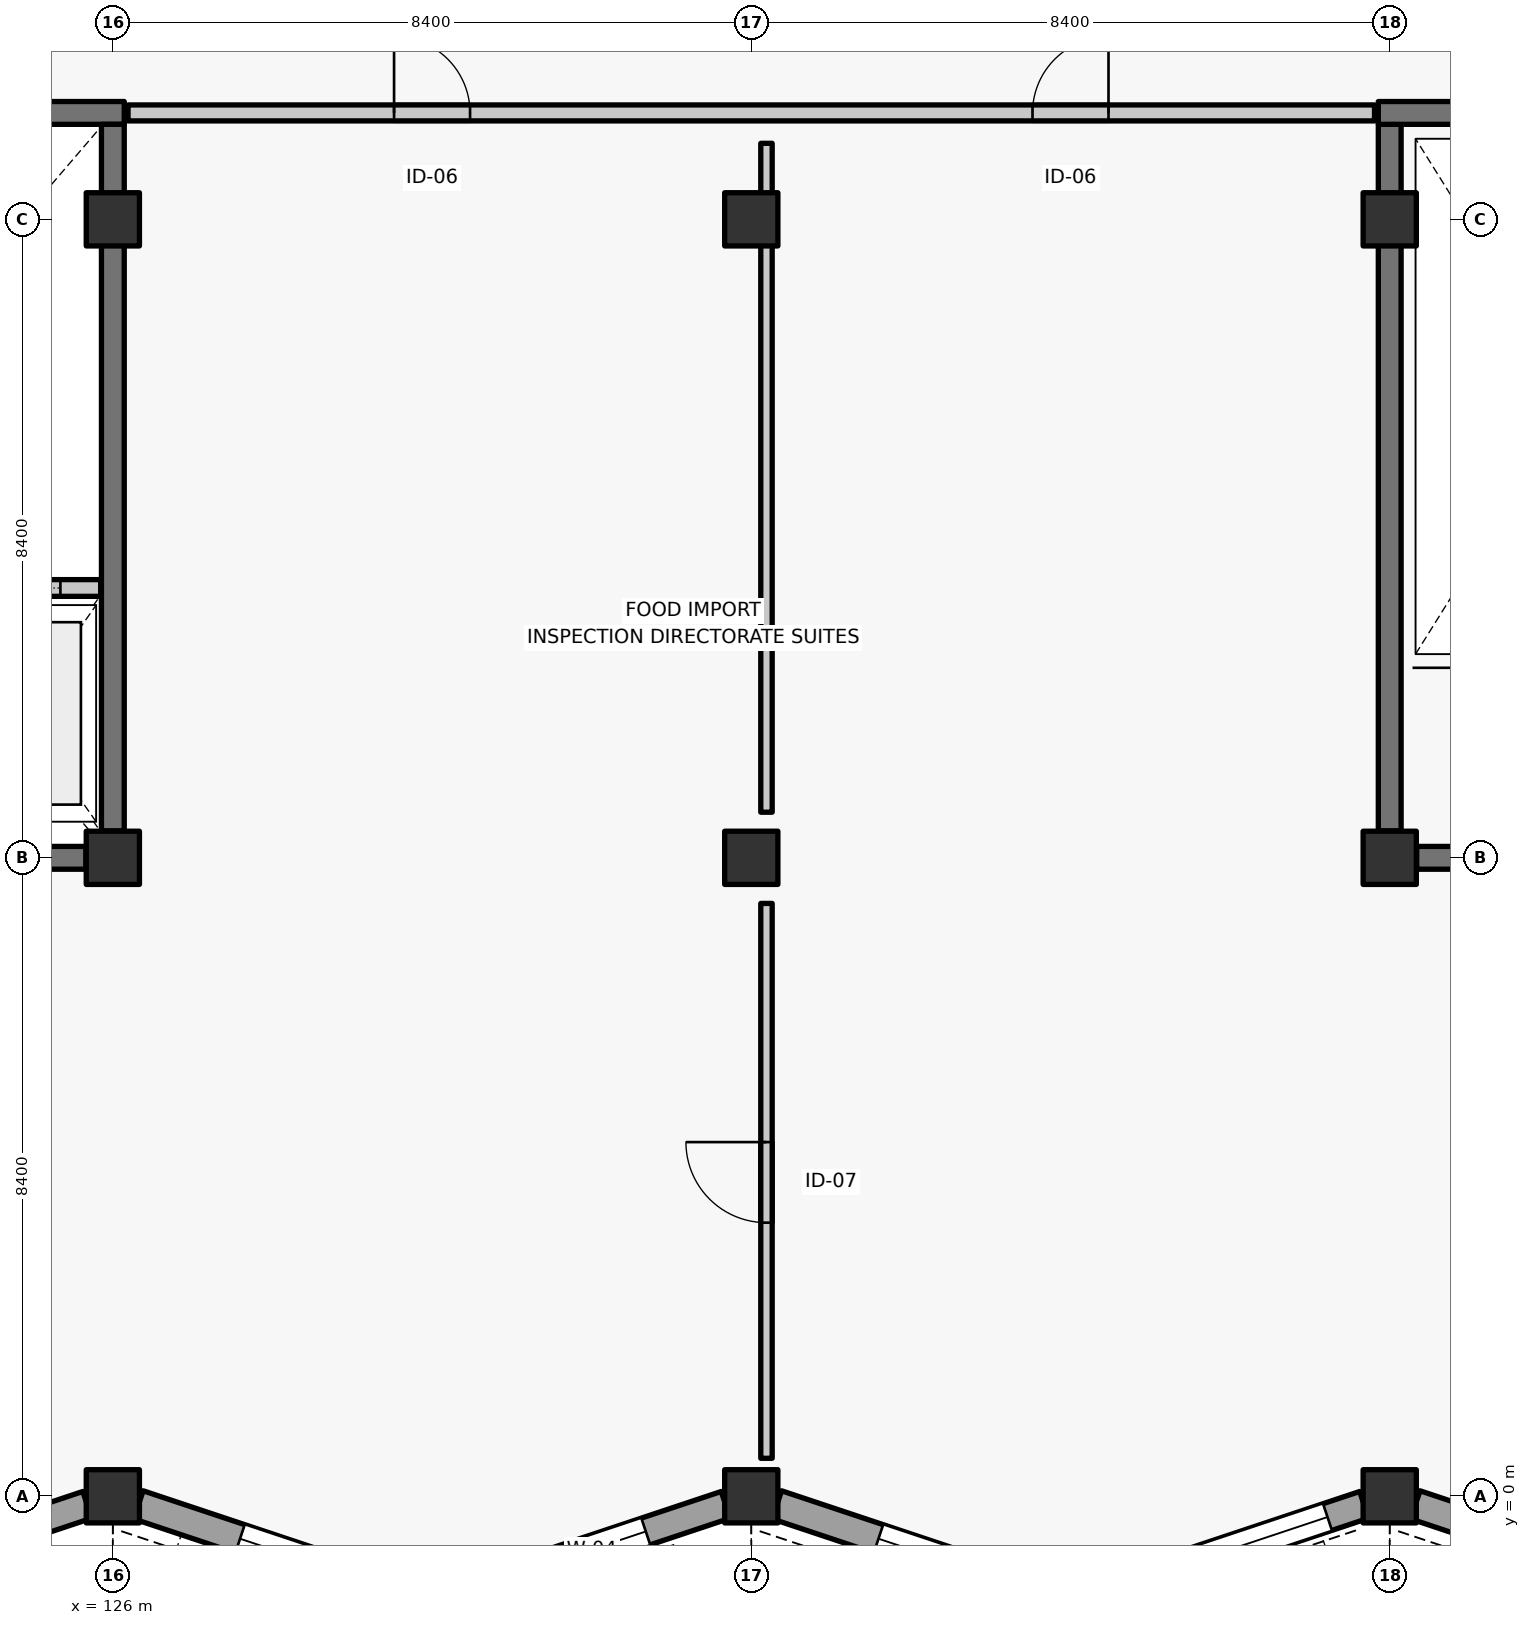
"""IFC4 building model, lengths in metres.
Left out: names, types, materials, properties, quantities, classifications, styles, units other than length and angle.
Written with IfcOpenShell. Run it as: python <this file> out.ifc"""

import sys

from ifc_helpers import new_model, si_unit, direction, frame, frame_2d, origin, origin_2d, place, context, subcontext, project, spatial, rectangle, extrude, element, fill, save


model = new_model("IFC4")
c1 = context("Model", 3, precision=1e-05, world=origin(), true_north=direction((0.0, 1.0)))
c2 = subcontext(c1, "Body", "Model", "MODEL_VIEW")
j1 = project(units=[si_unit("LENGTHUNIT", "METRE"), si_unit("PLANEANGLEUNIT", "RADIAN")], contexts=[c1])
p1 = place(None, origin())
s1 = spatial("IfcSite", under=j1, at=p1, CompositionType="ELEMENT")
p2 = place(p1, origin())
s2 = spatial("IfcBuilding", under=s1, at=p2, CompositionType="ELEMENT")
p3 = place(p2, frame((0.0, 0.0, 11.4)))
s3 = spatial("IfcBuildingStorey", under=s2, at=p3, CompositionType="ELEMENT", Elevation=11.4)
for number, where, z_axis, x_axis in (
    (1, (126.0, 0.0, 0.0), (0.0, 0.0, 1.0), (1.0, 0.0, 0.0)),
    (2, (126.0, 8.4, 0.0), (0.0, 0.0, 1.0), (1.0, 0.0, 0.0)),
    (3, (126.0, 16.8, 0.0), (0.0, 0.0, 1.0), (1.0, 0.0, 0.0)),
    (4, (134.4, 0.0, 0.0), (0.0, 0.0, 1.0), (1.0, 0.0, 0.0)),
    (5, (134.4, 8.4, 0.0), (0.0, 0.0, 1.0), (1.0, 0.0, 0.0)),
    (6, (134.4, 16.8, 0.0), (0.0, 0.0, 1.0), (1.0, 0.0, 0.0)),
    (7, (142.8, 0.0, 0.0), (0.0, 0.0, 1.0), (1.0, 0.0, 0.0)),
    (8, (142.8, 8.4, 0.0), (0.0, 0.0, 1.0), (1.0, 0.0, 0.0)),
    (9, (142.8, 16.8, 0.0), (0.0, 0.0, 1.0), (1.0, 0.0, 0.0)),
):
    element("IfcColumn", number, at=place(p3, frame(where, z_axis=z_axis, x_axis=x_axis)), inside=s3, PredefinedType="COLUMN", context=c2, shape_type="SweptSolid", body=[
        extrude(rectangle(XDim=0.7, YDim=0.7, at=origin_2d()), origin(), (0.0, 0.0, 1.0), 4.8),
    ])
p4 = place(p3, frame((125.663, -0.112, 0.0), z_axis=(0.0, 0.0, 1.0), x_axis=(-0.948689293515, -0.316209779056, 0.0)))
e10 = element("IfcWall", 10, at=p4, inside=s3, PredefinedType="SOLIDWALL", context=c2, shape_type="SweptSolid", body=[
    extrude(rectangle(XDim=4.072, YDim=0.37, at=frame_2d((2.036, 0.0))), origin(), (0.0, 0.0, 1.0), 4.52),
])
p5 = place(p4, frame((0.998, 0.0, 0.9)))
e11 = element("IfcOpeningElement", 11, at=p5, cuts=e10, PredefinedType="OPENING", context=c2, shape_type="SweptSolid", body=[
    extrude(rectangle(XDim=1.72, YDim=1.7, at=frame_2d((0.86, 0.85))), frame((0.0, 0.195, 0.0), z_axis=(0.0, -1.0, 0.0), x_axis=(1.0, 0.0, 0.0)), (0.0, 0.0, 1.0), 0.39),
])
p6 = place(p3, frame((130.2, -1.4, 0.0), z_axis=(0.0, 0.0, 1.0), x_axis=(-0.948689293515, 0.316209779056, 0.0)))
e12 = element("IfcWall", 12, at=p6, inside=s3, PredefinedType="SOLIDWALL", context=c2, shape_type="SweptSolid", body=[
    extrude(rectangle(XDim=4.072, YDim=0.39, at=frame_2d((2.036, 0.0))), origin(), (0.0, 0.0, 1.0), 4.52),
])
p7 = place(p6, frame((1.763, 0.0, 0.9)))
e13 = element("IfcOpeningElement", 13, at=p7, cuts=e12, PredefinedType="OPENING", context=c2, shape_type="SweptSolid", body=[
    extrude(rectangle(XDim=0.9, YDim=2.1, at=frame_2d((0.45, 1.05))), frame((0.0, 0.205, 0.0), z_axis=(0.0, -1.0, 0.0), x_axis=(1.0, 0.0, 0.0)), (0.0, 0.0, 1.0), 0.41),
])
p8 = place(p3, frame((134.063, -0.112, 0.0), z_axis=(0.0, 0.0, 1.0), x_axis=(-0.948695287956, -0.316191794027, 0.0)))
e14 = element("IfcWall", 14, at=p8, inside=s3, PredefinedType="SOLIDWALL", context=c2, shape_type="SweptSolid", body=[
    extrude(rectangle(XDim=4.072, YDim=0.37, at=frame_2d((2.036, 0.0))), origin(), (0.0, 0.0, 1.0), 4.52),
])
p9 = place(p8, frame((1.108, 0.0, 0.9)))
e15 = element("IfcOpeningElement", 15, at=p9, cuts=e14, PredefinedType="OPENING", context=c2, shape_type="SweptSolid", body=[
    extrude(rectangle(XDim=1.5, YDim=2.15, at=frame_2d((0.75, 1.075))), frame((0.0, 0.195, 0.0), z_axis=(0.0, -1.0, 0.0), x_axis=(1.0, 0.0, 0.0)), (0.0, 0.0, 1.0), 0.39),
])
p10 = place(p3, frame((138.6, -1.4, 0.0), z_axis=(0.0, 0.0, 1.0), x_axis=(-0.948695287956, 0.316191794027, 0.0)))
e16 = element("IfcWall", 16, at=p10, inside=s3, PredefinedType="SOLIDWALL", context=c2, shape_type="SweptSolid", body=[
    extrude(rectangle(XDim=4.072, YDim=0.39, at=frame_2d((2.036, 0.0))), origin(), (0.0, 0.0, 1.0), 4.52),
])
p11 = place(p10, frame((1.763, 0.0, 0.9)))
e17 = element("IfcOpeningElement", 17, at=p11, cuts=e16, PredefinedType="OPENING", context=c2, shape_type="SweptSolid", body=[
    extrude(rectangle(XDim=0.9, YDim=2.1, at=frame_2d((0.45, 1.05))), frame((0.0, 0.205, 0.0), z_axis=(0.0, -1.0, 0.0), x_axis=(1.0, 0.0, 0.0)), (0.0, 0.0, 1.0), 0.41),
])
p12 = place(p3, frame((142.463, -0.112, 0.0), z_axis=(0.0, 0.0, 1.0), x_axis=(-0.948689293515, -0.316209779056, 0.0)))
e18 = element("IfcWall", 18, at=p12, inside=s3, PredefinedType="SOLIDWALL", context=c2, shape_type="SweptSolid", body=[
    extrude(rectangle(XDim=4.072, YDim=0.37, at=frame_2d((2.036, 0.0))), origin(), (0.0, 0.0, 1.0), 4.52),
])
p13 = place(p12, frame((0.508, 0.0, 0.9)))
e19 = element("IfcOpeningElement", 19, at=p13, cuts=e18, PredefinedType="OPENING", context=c2, shape_type="SweptSolid", body=[
    extrude(rectangle(XDim=2.7, YDim=1.75, at=frame_2d((1.35, 0.875))), frame((0.0, 0.195, 0.0), z_axis=(0.0, -1.0, 0.0), x_axis=(1.0, 0.0, 0.0)), (0.0, 0.0, 1.0), 0.39),
])
p14 = place(p3, frame((147.0, -1.4, 0.0), z_axis=(0.0, 0.0, 1.0), x_axis=(-0.948695287956, 0.316191794027, 0.0)))
e20 = element("IfcWall", 20, at=p14, inside=s3, PredefinedType="SOLIDWALL", context=c2, shape_type="SweptSolid", body=[
    extrude(rectangle(XDim=4.072, YDim=0.39, at=frame_2d((2.036, 0.0))), origin(), (0.0, 0.0, 1.0), 4.52),
])
p15 = place(p14, frame((1.763, 0.0, 0.9)))
e21 = element("IfcOpeningElement", 21, at=p15, cuts=e20, PredefinedType="OPENING", context=c2, shape_type="SweptSolid", body=[
    extrude(rectangle(XDim=0.9, YDim=2.1, at=frame_2d((0.45, 1.05))), frame((0.0, 0.205, 0.0), z_axis=(0.0, -1.0, 0.0), x_axis=(1.0, 0.0, 0.0)), (0.0, 0.0, 1.0), 0.41),
])
p16 = place(p3, frame((125.645, 8.4, 0.0), z_axis=(0.0, 0.0, 1.0), x_axis=(-1.0, 0.0, 0.0)))
e22 = element("IfcWall", 22, at=p16, inside=s3, PredefinedType="SHEAR", context=c2, shape_type="SweptSolid", body=[
    extrude(rectangle(XDim=7.69, YDim=0.3, at=frame_2d((3.845, 0.0))), origin(), (0.0, 0.0, 1.0), 4.52),
])
p17 = place(p3, frame((117.45, 18.2, 0.0), z_axis=(0.0, 0.0, 1.0), x_axis=(1.0, 0.0, 0.0)))
e23 = element("IfcWall", 23, at=p17, inside=s3, PredefinedType="SHEAR", context=c2, shape_type="SweptSolid", body=[
    extrude(rectangle(XDim=8.7, YDim=0.3, at=frame_2d((4.35, 0.0))), origin(), (0.0, 0.0, 1.0), 4.52),
])
p18 = place(p17, frame((5.57, 0.0, 0.0)))
e24 = element("IfcOpeningElement", 24, at=p18, cuts=e23, PredefinedType="OPENING", context=c2, shape_type="SweptSolid", body=[
    extrude(rectangle(XDim=1.96, YDim=2.2, at=frame_2d((0.98, 1.1))), frame((0.0, 0.16, 0.0), z_axis=(0.0, -1.0, 0.0), x_axis=(1.0, 0.0, 0.0)), (0.0, 0.0, 1.0), 0.32),
])
p19 = place(p3, frame((126.0, 18.05, 0.0), z_axis=(0.0, 0.0, 1.0), x_axis=(0.0, -1.0, 0.0)))
e25 = element("IfcWall", 25, at=p19, inside=s3, PredefinedType="SHEAR", context=c2, shape_type="SweptSolid", body=[
    extrude(rectangle(XDim=9.295, YDim=0.3, at=frame_2d((4.647, 0.0))), origin(), (0.0, 0.0, 1.0), 4.52),
])
p20 = place(p3, frame((123.5, 11.95, 0.0), z_axis=(0.0, 0.0, 1.0), x_axis=(1.0, 0.0, 0.0)))
e26 = element("IfcWall", 26, at=p20, inside=s3, PredefinedType="SOLIDWALL", context=c2, shape_type="SweptSolid", body=[
    extrude(rectangle(XDim=2.34, YDim=0.22, at=frame_2d((1.17, 0.0))), origin(), (0.0, 0.0, 1.0), 4.52),
])
p21 = place(p20, frame((0.53, 0.0, 0.0)))
e27 = element("IfcOpeningElement", 27, at=p21, cuts=e26, PredefinedType="OPENING", context=c2, shape_type="SweptSolid", body=[
    extrude(rectangle(XDim=1.28, YDim=2.25, at=frame_2d((0.64, 1.125))), frame((0.0, 0.12, 0.0), z_axis=(0.0, -1.0, 0.0), x_axis=(1.0, 0.0, 0.0)), (0.0, 0.0, 1.0), 0.24),
])
p22 = place(p3, frame((150.845, 8.4, 0.0), z_axis=(0.0, 0.0, 1.0), x_axis=(-1.0, 0.0, 0.0)))
e28 = element("IfcWall", 28, at=p22, inside=s3, PredefinedType="SHEAR", context=c2, shape_type="SweptSolid", body=[
    extrude(rectangle(XDim=7.69, YDim=0.3, at=frame_2d((3.845, 0.0))), origin(), (0.0, 0.0, 1.0), 4.52),
])
p23 = place(p3, frame((142.8, 8.755, 0.0), z_axis=(0.0, 0.0, 1.0), x_axis=(0.0, 1.0, 0.0)))
e29 = element("IfcWall", 29, at=p23, inside=s3, PredefinedType="SHEAR", context=c2, shape_type="SweptSolid", body=[
    extrude(rectangle(XDim=9.295, YDim=0.3, at=frame_2d((4.647, 0.0))), origin(), (0.0, 0.0, 1.0), 4.52),
])
p24 = place(p3, frame((142.65, 18.2, 0.0), z_axis=(0.0, 0.0, 1.0), x_axis=(1.0, 0.0, 0.0)))
e30 = element("IfcWall", 30, at=p24, inside=s3, PredefinedType="SHEAR", context=c2, shape_type="SweptSolid", body=[
    extrude(rectangle(XDim=8.7, YDim=0.3, at=frame_2d((4.35, 0.0))), origin(), (0.0, 0.0, 1.0), 4.52),
])
p25 = place(p24, frame((5.57, 0.0, 0.0)))
e31 = element("IfcOpeningElement", 31, at=p25, cuts=e30, PredefinedType="OPENING", context=c2, shape_type="SweptSolid", body=[
    extrude(rectangle(XDim=1.96, YDim=2.2, at=frame_2d((0.98, 1.1))), frame((0.0, 0.16, 0.0), z_axis=(0.0, -1.0, 0.0), x_axis=(1.0, 0.0, 0.0)), (0.0, 0.0, 1.0), 0.32),
])
p26 = place(p3, frame((126.2, 18.2, 0.0), z_axis=(0.0, 0.0, 1.0), x_axis=(1.0, 0.0, 0.0)))
e32 = element("IfcWall", 32, at=p26, inside=s3, PredefinedType="PARTITIONING", context=c2, shape_type="SweptSolid", body=[
    extrude(rectangle(XDim=16.4, YDim=0.21, at=frame_2d((8.2, 0.0))), origin(), (0.0, 0.0, 1.0), 4.55),
])
p27 = place(p26, frame((3.5, 0.0, 0.0)))
e33 = element("IfcOpeningElement", 33, at=p27, cuts=e32, PredefinedType="OPENING", context=c2, shape_type="SweptSolid", body=[
    extrude(rectangle(XDim=1.0, YDim=2.15, at=frame_2d((0.5, 1.075))), frame((0.0, 0.115, 0.0), z_axis=(0.0, -1.0, 0.0), x_axis=(1.0, 0.0, 0.0)), (0.0, 0.0, 1.0), 0.23),
])
p28 = place(p26, frame((11.9, 0.0, 0.0)))
e34 = element("IfcOpeningElement", 34, at=p28, cuts=e32, PredefinedType="OPENING", context=c2, shape_type="SweptSolid", body=[
    extrude(rectangle(XDim=1.0, YDim=2.15, at=frame_2d((0.5, 1.075))), frame((0.0, 0.115, 0.0), z_axis=(0.0, -1.0, 0.0), x_axis=(1.0, 0.0, 0.0)), (0.0, 0.0, 1.0), 0.23),
])
p29 = place(p3, frame((134.6, 0.5, 0.0), z_axis=(0.0, 0.0, 1.0), x_axis=(0.0, 1.0, 0.0)))
e35 = element("IfcWall", 35, at=p29, inside=s3, PredefinedType="PARTITIONING", context=c2, shape_type="SweptSolid", body=[
    extrude(rectangle(XDim=7.3, YDim=0.15, at=frame_2d((3.65, 0.0))), origin(), (0.0, 0.0, 1.0), 4.55),
])
p30 = place(p29, frame((3.1, 0.0, 0.0)))
e36 = element("IfcOpeningElement", 36, at=p30, cuts=e35, PredefinedType="OPENING", context=c2, shape_type="SweptSolid", body=[
    extrude(rectangle(XDim=1.06, YDim=2.18, at=frame_2d((0.53, 1.09))), frame((0.0, 0.085, 0.0), z_axis=(0.0, -1.0, 0.0), x_axis=(1.0, 0.0, 0.0)), (0.0, 0.0, 1.0), 0.17),
])
p31 = place(p3, frame((134.6, 9.0, 0.0), z_axis=(0.0, 0.0, 1.0), x_axis=(0.0, 1.0, 0.0)))
e37 = element("IfcWall", 37, at=p31, inside=s3, PredefinedType="PARTITIONING", context=c2, shape_type="SweptSolid", body=[
    extrude(rectangle(XDim=8.8, YDim=0.15, at=frame_2d((4.4, 0.0))), origin(), (0.0, 0.0, 1.0), 4.55),
])
p32 = place(p7, origin())
e38 = element("IfcWindow", 38, at=p32, inside=s3, PartitioningType="SINGLE_PANEL", PredefinedType="WINDOW", context=c2, shape_type="SweptSolid", body=[
    extrude(rectangle(XDim=0.9, YDim=2.1, at=frame_2d((0.45, 1.05))), frame((0.0, 0.03, 0.0), z_axis=(0.0, -1.0, 0.0), x_axis=(1.0, 0.0, 0.0)), (0.0, 0.0, 1.0), 0.06),
])
fill(e13, e38)
p33 = place(p9, origin())
e39 = element("IfcWindow", 39, at=p33, inside=s3, PartitioningType="SINGLE_PANEL", PredefinedType="WINDOW", context=c2, shape_type="SweptSolid", body=[
    extrude(rectangle(XDim=1.5, YDim=2.15, at=frame_2d((0.75, 1.075))), frame((0.0, 0.03, 0.0), z_axis=(0.0, -1.0, 0.0), x_axis=(1.0, 0.0, 0.0)), (0.0, 0.0, 1.0), 0.06),
])
fill(e15, e39)
p34 = place(p11, origin())
e40 = element("IfcWindow", 40, at=p34, inside=s3, PartitioningType="SINGLE_PANEL", PredefinedType="WINDOW", context=c2, shape_type="SweptSolid", body=[
    extrude(rectangle(XDim=0.9, YDim=2.1, at=frame_2d((0.45, 1.05))), frame((0.0, 0.03, 0.0), z_axis=(0.0, -1.0, 0.0), x_axis=(1.0, 0.0, 0.0)), (0.0, 0.0, 1.0), 0.06),
])
fill(e17, e40)
p35 = place(p13, origin())
e41 = element("IfcWindow", 41, at=p35, inside=s3, PartitioningType="SINGLE_PANEL", PredefinedType="WINDOW", context=c2, shape_type="SweptSolid", body=[
    extrude(rectangle(XDim=2.7, YDim=1.75, at=frame_2d((1.35, 0.875))), frame((0.0, 0.03, 0.0), z_axis=(0.0, -1.0, 0.0), x_axis=(1.0, 0.0, 0.0)), (0.0, 0.0, 1.0), 0.06),
])
fill(e19, e41)
p36 = place(p21, origin())
e42 = element("IfcDoor", 42, at=p36, inside=s3, OperationType="SLIDING_TO_LEFT", PredefinedType="DOOR", context=c2, shape_type="SweptSolid", body=[
    extrude(rectangle(XDim=1.28, YDim=2.25, at=frame_2d((0.64, 1.125))), frame((0.0, 0.025, 0.0), z_axis=(0.0, -1.0, 0.0), x_axis=(1.0, 0.0, 0.0)), (0.0, 0.0, 1.0), 0.05),
])
fill(e27, e42)
p37 = place(p27, origin())
e43 = element("IfcDoor", 43, at=p37, inside=s3, OperationType="SINGLE_SWING_LEFT", PredefinedType="DOOR", context=c2, shape_type="SweptSolid", body=[
    extrude(rectangle(XDim=1.0, YDim=2.15, at=frame_2d((0.5, 1.075))), frame((0.0, 0.025, 0.0), z_axis=(0.0, -1.0, 0.0), x_axis=(1.0, 0.0, 0.0)), (0.0, 0.0, 1.0), 0.05),
])
fill(e33, e43)
p38 = place(p28, origin())
e44 = element("IfcDoor", 44, at=p38, inside=s3, OperationType="SINGLE_SWING_RIGHT", PredefinedType="DOOR", context=c2, shape_type="SweptSolid", body=[
    extrude(rectangle(XDim=1.0, YDim=2.15, at=frame_2d((0.5, 1.075))), frame((0.0, 0.025, 0.0), z_axis=(0.0, -1.0, 0.0), x_axis=(1.0, 0.0, 0.0)), (0.0, 0.0, 1.0), 0.05),
])
fill(e34, e44)
p39 = place(p30, origin())
e45 = element("IfcDoor", 45, at=p39, inside=s3, OperationType="SINGLE_SWING_RIGHT", PredefinedType="DOOR", context=c2, shape_type="SweptSolid", body=[
    extrude(rectangle(XDim=1.06, YDim=2.18, at=frame_2d((0.53, 1.09))), frame((0.0, 0.025, 0.0), z_axis=(0.0, -1.0, 0.0), x_axis=(1.0, 0.0, 0.0)), (0.0, 0.0, 1.0), 0.05),
])
fill(e36, e45)
save(model, sys.argv[1])
